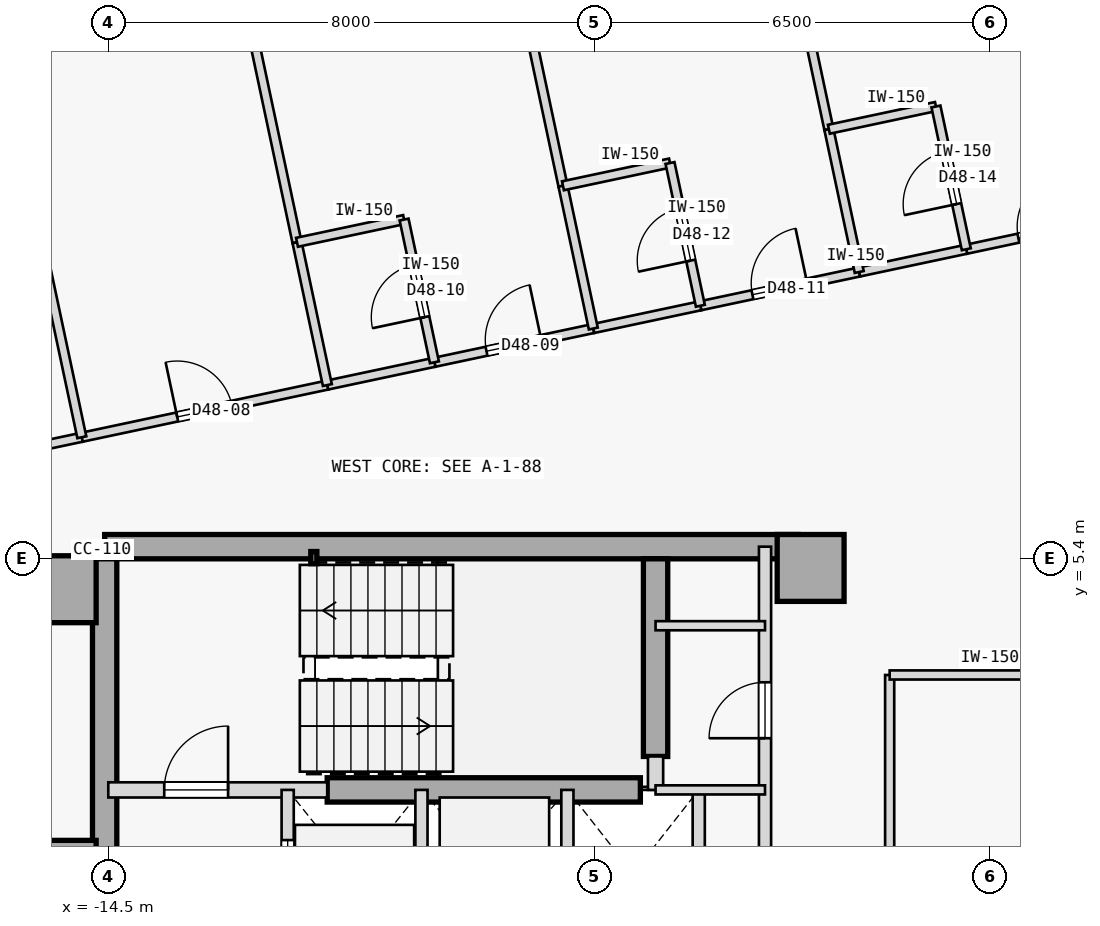
"""IFC4 building model, lengths in metres.
Left out: names, types, materials, properties, quantities, classifications, styles, units other than length and angle.
Written with IfcOpenShell. Run it as: python <this file> out.ifc"""

import sys

from ifc_helpers import new_model, si_unit, direction, frame, frame_2d, origin, origin_2d, place, context, subcontext, project, spatial, rectangle, hollow_rectangle, extrude, element, fill, save


model = new_model("IFC4")
c1 = context("Model", 3, precision=1e-05, world=origin(), true_north=direction((0.0, 1.0)))
c2 = subcontext(c1, "Body", "Model", "MODEL_VIEW")
j1 = project(units=[si_unit("LENGTHUNIT", "METRE"), si_unit("PLANEANGLEUNIT", "RADIAN")], contexts=[c1])
p1 = place(None, origin())
s1 = spatial("IfcSite", under=j1, at=p1, CompositionType="ELEMENT")
p2 = place(p1, origin())
s2 = spatial("IfcBuilding", under=s1, at=p2, CompositionType="ELEMENT")
p3 = place(p2, frame((0.0, 0.0, 185.4)))
s3 = spatial("IfcBuildingStorey", under=s2, at=p3, CompositionType="ELEMENT", Elevation=185.4)
for number, where, z_axis, x_axis in (
    (1, (-15.25, 4.9, 0.0), (0.0, 0.0, 1.0), (1.0, 0.0, 0.0)),
    (2, (-15.25, 0.22, 0.0), (0.0, 0.0, 1.0), (1.0, 0.0, 0.0)),
    (3, (-2.95, 5.25, 0.0), (0.0, 0.0, 1.0), (1.0, 0.0, 0.0)),
):
    element("IfcColumn", number, at=place(p3, frame(where, z_axis=z_axis, x_axis=x_axis)), inside=s3, PredefinedType="COLUMN", context=c2, shape_type="SweptSolid", body=[
        extrude(rectangle(XDim=1.1, YDim=1.1, at=origin_2d()), origin(), (0.0, 0.0, 1.0), 3.4),
    ])
p4 = place(p3, frame((-14.56, 5.6, 0.0), z_axis=(0.0, 0.0, 1.0), x_axis=(1.0, 0.0, 0.0)))
e4 = element("IfcWall", 4, at=p4, inside=s3, PredefinedType="SHEAR", context=c2, shape_type="SweptSolid", body=[
    extrude(rectangle(XDim=11.41, YDim=0.4, at=frame_2d((5.705, 0.0))), origin(), (0.0, 0.0, 1.0), 3.175),
])
p5 = place(p3, frame((-14.56, -5.4, 0.0), z_axis=(0.0, 0.0, 1.0), x_axis=(0.0, 1.0, 0.0)))
e5 = element("IfcWall", 5, at=p5, inside=s3, PredefinedType="SHEAR", context=c2, shape_type="SweptSolid", body=[
    extrude(rectangle(XDim=10.8, YDim=0.4, at=frame_2d((5.4, 0.0))), origin(), (0.0, 0.0, 1.0), 3.175),
])
p6 = place(p3, frame((-5.5, 2.15, 0.0), z_axis=(0.0, 0.0, 1.0), x_axis=(0.0, 1.0, 0.0)))
e6 = element("IfcWall", 6, at=p6, inside=s3, PredefinedType="SHEAR", context=c2, shape_type="SweptSolid", body=[
    extrude(rectangle(XDim=3.25, YDim=0.4, at=frame_2d((1.625, 0.0))), origin(), (0.0, 0.0, 1.0), 3.175),
])
p7 = place(p3, frame((-10.9, 1.6, 0.0), z_axis=(0.0, 0.0, 1.0), x_axis=(1.0, 0.0, 0.0)))
e7 = element("IfcWall", 7, at=p7, inside=s3, PredefinedType="SHEAR", context=c2, shape_type="SweptSolid", body=[
    extrude(rectangle(XDim=5.15, YDim=0.4, at=frame_2d((2.575, 0.0))), origin(), (0.0, 0.0, 1.0), 3.175),
])
p8 = place(p3, frame((-11.12, 5.42, 0.0), z_axis=(0.0, 0.0, 1.0), x_axis=(1.0, 0.0, 0.0)))
e8 = element("IfcColumn", 8, at=p8, inside=s3, PredefinedType="COLUMN", context=c2, shape_type="SweptSolid", body=[
    extrude(hollow_rectangle(XDim=0.1, YDim=0.2, WallThickness=0.008, at=origin_2d()), origin(), (0.0, 0.0, 1.0), 3.4),
])
p9 = place(p3, frame((-14.5, 1.6, 0.0), z_axis=(0.0, 0.0, 1.0), x_axis=(1.0, 0.0, 0.0)))
e9 = element("IfcWall", 9, at=p9, inside=s3, PredefinedType="STANDARD", context=c2, shape_type="SweptSolid", body=[
    extrude(rectangle(XDim=3.6, YDim=0.25, at=frame_2d((1.8, 0.0))), origin(), (0.0, 0.0, 1.0), 3.175),
])
p10 = place(p9, frame((0.92, 0.0, 0.0)))
e10 = element("IfcOpeningElement", 10, at=p10, cuts=e9, PredefinedType="OPENING", context=c2, shape_type="SweptSolid", body=[
    extrude(rectangle(XDim=1.05, YDim=2.15, at=frame_2d((0.525, 1.075))), frame((0.0, 0.135, 0.0), z_axis=(0.0, -1.0, 0.0), x_axis=(1.0, 0.0, 0.0)), (0.0, 0.0, 1.0), 0.27),
])
p11 = place(p3, frame((-5.5, 1.6, 0.0), z_axis=(0.0, 0.0, 1.0), x_axis=(0.0, 1.0, 0.0)))
e11 = element("IfcWall", 11, at=p11, inside=s3, PredefinedType="STANDARD", context=c2, shape_type="SweptSolid", body=[
    extrude(rectangle(XDim=0.55, YDim=0.25, at=frame_2d((0.275, 0.0))), origin(), (0.0, 0.0, 1.0), 3.175),
])
p12 = place(p3, frame((-3.7, -1.15, 0.0), z_axis=(0.0, 0.0, 1.0), x_axis=(0.0, 1.0, 0.0)))
e12 = element("IfcWall", 12, at=p12, inside=s3, PredefinedType="STANDARD", context=c2, shape_type="SweptSolid", body=[
    extrude(rectangle(XDim=6.75, YDim=0.2, at=frame_2d((3.375, 0.0))), origin(), (0.0, 0.0, 1.0), 3.175),
])
p13 = place(p12, frame((3.6, 0.0, 0.0)))
e13 = element("IfcOpeningElement", 13, at=p13, cuts=e12, PredefinedType="OPENING", context=c2, shape_type="SweptSolid", body=[
    extrude(rectangle(XDim=0.92, YDim=2.15, at=frame_2d((0.46, 1.075))), frame((0.0, 0.11, 0.0), z_axis=(0.0, -1.0, 0.0), x_axis=(1.0, 0.0, 0.0)), (0.0, 0.0, 1.0), 0.22),
])
p14 = place(p12, frame((0.85, 0.0, 0.0)))
e14 = element("IfcOpeningElement", 14, at=p14, cuts=e12, PredefinedType="OPENING", context=c2, shape_type="SweptSolid", body=[
    extrude(rectangle(XDim=0.9, YDim=2.15, at=frame_2d((0.45, 1.075))), frame((0.0, 0.11, 0.0), z_axis=(0.0, -1.0, 0.0), x_axis=(1.0, 0.0, 0.0)), (0.0, 0.0, 1.0), 0.22),
])
p15 = place(p3, frame((-11.55, -1.15, 0.0), z_axis=(0.0, 0.0, 1.0), x_axis=(0.0, 1.0, 0.0)))
e15 = element("IfcWall", 15, at=p15, inside=s3, PredefinedType="STANDARD", context=c2, shape_type="SweptSolid", body=[
    extrude(rectangle(XDim=2.75, YDim=0.2, at=frame_2d((1.375, 0.0))), origin(), (0.0, 0.0, 1.0), 3.175),
])
p16 = place(p15, frame((0.825, 0.0, 0.0)))
e16 = element("IfcOpeningElement", 16, at=p16, cuts=e15, PredefinedType="OPENING", context=c2, shape_type="SweptSolid", body=[
    extrude(rectangle(XDim=1.1, YDim=2.15, at=frame_2d((0.55, 1.075))), frame((0.0, 0.11, 0.0), z_axis=(0.0, -1.0, 0.0), x_axis=(1.0, 0.0, 0.0)), (0.0, 0.0, 1.0), 0.22),
])
for number, where, z_axis, x_axis in (
    (17, (-9.35, -1.15, 0.0), (0.0, 0.0, 1.0), (0.0, 1.0, 0.0)),
    (18, (-6.95, -1.15, 0.0), (0.0, 0.0, 1.0), (0.0, 1.0, 0.0)),
    (19, (-4.79, -1.15, 0.0), (0.0, 0.0, 1.0), (0.0, 1.0, 0.0)),
):
    element("IfcWall", number, at=place(p3, frame(where, z_axis=z_axis, x_axis=x_axis)), inside=s3, PredefinedType="STANDARD", context=c2, shape_type="SweptSolid", body=[
        extrude(rectangle(XDim=2.75, YDim=0.2, at=frame_2d((1.375, 0.0))), origin(), (0.0, 0.0, 1.0), 3.175),
    ])
for number, where, z_axis, x_axis in (
    (20, (-5.5, 4.3, 0.0), (0.0, 0.0, 1.0), (1.0, 0.0, 0.0)),
    (21, (-5.5, 1.6, 0.0), (0.0, 0.0, 1.0), (1.0, 0.0, 0.0)),
):
    element("IfcWall", number, at=place(p3, frame(where, z_axis=z_axis, x_axis=x_axis)), inside=s3, PredefinedType="PARTITIONING", context=c2, shape_type="SweptSolid", body=[
        extrude(rectangle(XDim=1.8, YDim=0.15, at=frame_2d((0.9, 0.0))), origin(), (0.0, 0.0, 1.0), 3.175),
    ])
p17 = place(p3, frame((-1.65, -3.49, 0.0), z_axis=(0.0, 0.0, 1.0), x_axis=(-3.4979712e-05, 0.999999999388, 0.0)))
e22 = element("IfcWall", 22, at=p17, inside=s3, PredefinedType="PARTITIONING", context=c2, shape_type="SweptSolid", body=[
    extrude(rectangle(XDim=6.979, YDim=0.15, at=frame_2d((3.49, 0.0))), origin(), (0.0, 0.0, 1.0), 3.175),
])
p18 = place(p3, frame((-1.65, 3.49, 0.0), z_axis=(0.0, 0.0, 1.0), x_axis=(1.0, 0.0, 0.0)))
e23 = element("IfcWall", 23, at=p18, inside=s3, PredefinedType="PARTITIONING", context=c2, shape_type="SweptSolid", body=[
    extrude(rectangle(XDim=3.3, YDim=0.15, at=frame_2d((1.65, 0.0))), origin(), (0.0, 0.0, 1.0), 3.175),
])
p19 = place(p3, frame((-17.162, 6.926, 0.0), z_axis=(0.0, 0.0, 1.0), x_axis=(0.978124500572, 0.208020338863, 0.0)))
e24 = element("IfcWall", 24, at=p19, inside=s3, PredefinedType="PARTITIONING", context=c2, shape_type="SweptSolid", body=[
    extrude(rectangle(XDim=2.277, YDim=0.15, at=frame_2d((1.138, 0.0))), origin(), (0.0, 0.0, 1.0), 3.175),
])
p20 = place(p3, frame((-14.935, 7.399, 0.0), z_axis=(0.0, 0.0, 1.0), x_axis=(0.978153289129, 0.20788492722, 0.0)))
e25 = element("IfcWall", 25, at=p20, inside=s3, PredefinedType="PARTITIONING", context=c2, shape_type="SweptSolid", body=[
    extrude(rectangle(XDim=4.128, YDim=0.15, at=frame_2d((2.064, 0.0))), origin(), (0.0, 0.0, 1.0), 3.175),
])
p21 = place(p20, frame((1.604, 0.0, 0.0)))
e26 = element("IfcOpeningElement", 26, at=p21, cuts=e25, PredefinedType="OPENING", context=c2, shape_type="SweptSolid", body=[
    extrude(rectangle(XDim=0.92, YDim=2.15, at=frame_2d((0.46, 1.075))), frame((0.0, 0.085, 0.0), z_axis=(0.0, -1.0, 0.0), x_axis=(1.0, 0.0, 0.0)), (0.0, 0.0, 1.0), 0.17),
])
p22 = place(p3, frame((-9.137, 8.632, 0.0), z_axis=(0.0, 0.0, 1.0), x_axis=(0.978158153975, 0.207862035524, 0.0)))
e27 = element("IfcWall", 27, at=p22, inside=s3, PredefinedType="PARTITIONING", context=c2, shape_type="SweptSolid", body=[
    extrude(rectangle(XDim=2.671, YDim=0.15, at=frame_2d((1.335, 0.0))), origin(), (0.0, 0.0, 1.0), 3.175),
])
p23 = place(p22, frame((0.875, 0.0, 0.0)))
e28 = element("IfcOpeningElement", 28, at=p23, cuts=e27, PredefinedType="OPENING", context=c2, shape_type="SweptSolid", body=[
    extrude(rectangle(XDim=0.92, YDim=2.15, at=frame_2d((0.46, 1.075))), frame((0.0, 0.085, 0.0), z_axis=(0.0, -1.0, 0.0), x_axis=(1.0, 0.0, 0.0)), (0.0, 0.0, 1.0), 0.17),
])
p24 = place(p3, frame((-10.897, 8.258, 0.0), z_axis=(0.0, 0.0, 1.0), x_axis=(0.978146440129, 0.207917150959, 0.0)))
e29 = element("IfcWall", 29, at=p24, inside=s3, PredefinedType="PARTITIONING", context=c2, shape_type="SweptSolid", body=[
    extrude(rectangle(XDim=1.8, YDim=0.15, at=frame_2d((0.9, 0.0))), origin(), (0.0, 0.0, 1.0), 3.175),
])
p25 = place(p3, frame((-4.763, 9.561, 0.0), z_axis=(0.0, 0.0, 1.0), x_axis=(0.978139565144, 0.207949491702, 0.0)))
e30 = element("IfcWall", 30, at=p25, inside=s3, PredefinedType="PARTITIONING", context=c2, shape_type="SweptSolid", body=[
    extrude(rectangle(XDim=2.671, YDim=0.15, at=frame_2d((1.335, 0.0))), origin(), (0.0, 0.0, 1.0), 3.175),
])
p26 = place(p25, frame((0.875, 0.0, 0.0)))
e31 = element("IfcOpeningElement", 31, at=p26, cuts=e30, PredefinedType="OPENING", context=c2, shape_type="SweptSolid", body=[
    extrude(rectangle(XDim=0.92, YDim=2.15, at=frame_2d((0.46, 1.075))), frame((0.0, 0.085, 0.0), z_axis=(0.0, -1.0, 0.0), x_axis=(1.0, 0.0, 0.0)), (0.0, 0.0, 1.0), 0.17),
])
p27 = place(p3, frame((-6.524, 9.187, 0.0), z_axis=(0.0, 0.0, 1.0), x_axis=(0.978146440129, 0.207917150959, 0.0)))
e32 = element("IfcWall", 32, at=p27, inside=s3, PredefinedType="PARTITIONING", context=c2, shape_type="SweptSolid", body=[
    extrude(rectangle(XDim=1.8, YDim=0.15, at=frame_2d((0.9, 0.0))), origin(), (0.0, 0.0, 1.0), 3.175),
])
p28 = place(p3, frame((-0.39, 10.491, 0.0), z_axis=(0.0, 0.0, 1.0), x_axis=(0.978155367406, 0.207875148141, 0.0)))
e33 = element("IfcWall", 33, at=p28, inside=s3, PredefinedType="PARTITIONING", context=c2, shape_type="SweptSolid", body=[
    extrude(rectangle(XDim=2.672, YDim=0.15, at=frame_2d((1.336, 0.0))), origin(), (0.0, 0.0, 1.0), 3.175),
])
p29 = place(p28, frame((0.876, 0.0, 0.0)))
e34 = element("IfcOpeningElement", 34, at=p29, cuts=e33, PredefinedType="OPENING", context=c2, shape_type="SweptSolid", body=[
    extrude(rectangle(XDim=0.92, YDim=2.15, at=frame_2d((0.46, 1.075))), frame((0.0, 0.085, 0.0), z_axis=(0.0, -1.0, 0.0), x_axis=(1.0, 0.0, 0.0)), (0.0, 0.0, 1.0), 0.17),
])
p30 = place(p3, frame((-2.151, 10.117, 0.0), z_axis=(0.0, 0.0, 1.0), x_axis=(0.978146440129, 0.207917150959, 0.0)))
e35 = element("IfcWall", 35, at=p30, inside=s3, PredefinedType="PARTITIONING", context=c2, shape_type="SweptSolid", body=[
    extrude(rectangle(XDim=1.8, YDim=0.15, at=frame_2d((0.9, 0.0))), origin(), (0.0, 0.0, 1.0), 3.175),
])
p31 = place(p3, frame((-14.935, 7.399, 0.0), z_axis=(0.0, 0.0, 1.0), x_axis=(-0.207899121568, 0.978150272326, 0.0)))
e36 = element("IfcWall", 36, at=p31, inside=s3, PredefinedType="PARTITIONING", context=c2, shape_type="SweptSolid", body=[
    extrude(rectangle(XDim=14.395, YDim=0.15, at=frame_2d((7.197, 0.0))), origin(), (0.0, 0.0, 1.0), 3.175),
])
p32 = place(p3, frame((-11.396, 10.605, 0.0), z_axis=(0.0, 0.0, 1.0), x_axis=(-0.207910848762, 0.978147779718, 0.0)))
e37 = element("IfcWall", 37, at=p32, inside=s3, PredefinedType="PARTITIONING", context=c2, shape_type="SweptSolid", body=[
    extrude(rectangle(XDim=11.995, YDim=0.15, at=frame_2d((5.998, 0.0))), origin(), (0.0, 0.0, 1.0), 3.175),
])
p33 = place(p3, frame((-10.897, 8.258, 0.0), z_axis=(0.0, 0.0, 1.0), x_axis=(-0.207937840262, 0.978142042133, 0.0)))
e38 = element("IfcWall", 38, at=p33, inside=s3, PredefinedType="PARTITIONING", context=c2, shape_type="SweptSolid", body=[
    extrude(rectangle(XDim=2.4, YDim=0.15, at=frame_2d((1.2, 0.0))), origin(), (0.0, 0.0, 1.0), 3.175),
])
p34 = place(p3, frame((-11.396, 10.605, 0.0), z_axis=(0.0, 0.0, 1.0), x_axis=(0.978118849246, 0.208046909975, 0.0)))
e39 = element("IfcWall", 39, at=p34, inside=s3, PredefinedType="PARTITIONING", context=c2, shape_type="SweptSolid", body=[
    extrude(rectangle(XDim=1.8, YDim=0.15, at=frame_2d((0.9, 0.0))), origin(), (0.0, 0.0, 1.0), 3.175),
])
p35 = place(p3, frame((-9.137, 8.632, 0.0), z_axis=(0.0, 0.0, 1.0), x_axis=(-0.207917150959, 0.978146440129, 0.0)))
e40 = element("IfcWall", 40, at=p35, inside=s3, PredefinedType="PARTITIONING", context=c2, shape_type="SweptSolid", body=[
    extrude(rectangle(XDim=2.4, YDim=0.15, at=frame_2d((1.2, 0.0))), origin(), (0.0, 0.0, 1.0), 3.175),
])
p36 = place(p35, frame((0.76, 0.0, 0.0)))
e41 = element("IfcOpeningElement", 41, at=p36, cuts=e40, PredefinedType="OPENING", context=c2, shape_type="SweptSolid", body=[
    extrude(rectangle(XDim=0.88, YDim=2.15, at=frame_2d((0.44, 1.075))), frame((0.0, 0.085, 0.0), z_axis=(0.0, -1.0, 0.0), x_axis=(1.0, 0.0, 0.0)), (0.0, 0.0, 1.0), 0.17),
])
p37 = place(p3, frame((-7.023, 11.535, 0.0), z_axis=(0.0, 0.0, 1.0), x_axis=(-0.207910848762, 0.978147779718, 0.0)))
e42 = element("IfcWall", 42, at=p37, inside=s3, PredefinedType="PARTITIONING", context=c2, shape_type="SweptSolid", body=[
    extrude(rectangle(XDim=11.995, YDim=0.15, at=frame_2d((5.998, 0.0))), origin(), (0.0, 0.0, 1.0), 3.175),
])
p38 = place(p3, frame((-6.524, 9.187, 0.0), z_axis=(0.0, 0.0, 1.0), x_axis=(-0.207917150959, 0.978146440129, 0.0)))
e43 = element("IfcWall", 43, at=p38, inside=s3, PredefinedType="PARTITIONING", context=c2, shape_type="SweptSolid", body=[
    extrude(rectangle(XDim=2.4, YDim=0.15, at=frame_2d((1.2, 0.0))), origin(), (0.0, 0.0, 1.0), 3.175),
])
p39 = place(p3, frame((-7.023, 11.535, 0.0), z_axis=(0.0, 0.0, 1.0), x_axis=(0.978146440129, 0.207917150959, 0.0)))
e44 = element("IfcWall", 44, at=p39, inside=s3, PredefinedType="PARTITIONING", context=c2, shape_type="SweptSolid", body=[
    extrude(rectangle(XDim=1.8, YDim=0.15, at=frame_2d((0.9, 0.0))), origin(), (0.0, 0.0, 1.0), 3.175),
])
p40 = place(p3, frame((-4.763, 9.561, 0.0), z_axis=(0.0, 0.0, 1.0), x_axis=(-0.207917150959, 0.978146440129, 0.0)))
e45 = element("IfcWall", 45, at=p40, inside=s3, PredefinedType="PARTITIONING", context=c2, shape_type="SweptSolid", body=[
    extrude(rectangle(XDim=2.4, YDim=0.15, at=frame_2d((1.2, 0.0))), origin(), (0.0, 0.0, 1.0), 3.175),
])
p41 = place(p40, frame((0.76, 0.0, 0.0)))
e46 = element("IfcOpeningElement", 46, at=p41, cuts=e45, PredefinedType="OPENING", context=c2, shape_type="SweptSolid", body=[
    extrude(rectangle(XDim=0.88, YDim=2.15, at=frame_2d((0.44, 1.075))), frame((0.0, 0.085, 0.0), z_axis=(0.0, -1.0, 0.0), x_axis=(1.0, 0.0, 0.0)), (0.0, 0.0, 1.0), 0.17),
])
p42 = place(p3, frame((-2.65, 12.464, 0.0), z_axis=(0.0, 0.0, 1.0), x_axis=(-0.207914988081, 0.978146899873, 0.0)))
e47 = element("IfcWall", 47, at=p42, inside=s3, PredefinedType="PARTITIONING", context=c2, shape_type="SweptSolid", body=[
    extrude(rectangle(XDim=11.995, YDim=0.15, at=frame_2d((5.998, 0.0))), origin(), (0.0, 0.0, 1.0), 3.175),
])
p43 = place(p3, frame((-2.151, 10.117, 0.0), z_axis=(0.0, 0.0, 1.0), x_axis=(-0.207917150959, 0.978146440129, 0.0)))
e48 = element("IfcWall", 48, at=p43, inside=s3, PredefinedType="PARTITIONING", context=c2, shape_type="SweptSolid", body=[
    extrude(rectangle(XDim=2.4, YDim=0.15, at=frame_2d((1.2, 0.0))), origin(), (0.0, 0.0, 1.0), 3.175),
])
p44 = place(p3, frame((-2.65, 12.464, 0.0), z_axis=(0.0, 0.0, 1.0), x_axis=(0.978174015353, 0.207787380965, 0.0)))
e49 = element("IfcWall", 49, at=p44, inside=s3, PredefinedType="PARTITIONING", context=c2, shape_type="SweptSolid", body=[
    extrude(rectangle(XDim=1.8, YDim=0.15, at=frame_2d((0.9, 0.0))), origin(), (0.0, 0.0, 1.0), 3.175),
])
p45 = place(p3, frame((-0.39, 10.491, 0.0), z_axis=(0.0, 0.0, 1.0), x_axis=(-0.207937840262, 0.978142042133, 0.0)))
e50 = element("IfcWall", 50, at=p45, inside=s3, PredefinedType="PARTITIONING", context=c2, shape_type="SweptSolid", body=[
    extrude(rectangle(XDim=2.4, YDim=0.15, at=frame_2d((1.2, 0.0))), origin(), (0.0, 0.0, 1.0), 3.175),
])
p46 = place(p45, frame((0.76, 0.0, 0.0)))
e51 = element("IfcOpeningElement", 51, at=p46, cuts=e50, PredefinedType="OPENING", context=c2, shape_type="SweptSolid", body=[
    extrude(rectangle(XDim=0.88, YDim=2.15, at=frame_2d((0.44, 1.075))), frame((0.0, 0.085, 0.0), z_axis=(0.0, -1.0, 0.0), x_axis=(1.0, 0.0, 0.0)), (0.0, 0.0, 1.0), 0.17),
])
p47 = place(p3, frame((1.725, 13.394, 0.0), z_axis=(0.0, 0.0, 1.0), x_axis=(-0.207910848762, 0.978147779718, 0.0)))
e52 = element("IfcWall", 52, at=p47, inside=s3, PredefinedType="PARTITIONING", context=c2, shape_type="SweptSolid", body=[
    extrude(rectangle(XDim=11.995, YDim=0.15, at=frame_2d((5.998, 0.0))), origin(), (0.0, 0.0, 1.0), 3.175),
])
p48 = place(p10, origin())
e53 = element("IfcDoor", 53, at=p48, inside=s3, OperationType="SINGLE_SWING_RIGHT", PredefinedType="DOOR", context=c2, shape_type="SweptSolid", body=[
    extrude(rectangle(XDim=1.05, YDim=2.15, at=frame_2d((0.525, 1.075))), frame((0.0, 0.025, 0.0), z_axis=(0.0, -1.0, 0.0), x_axis=(1.0, 0.0, 0.0)), (0.0, 0.0, 1.0), 0.05),
])
fill(e10, e53)
p49 = place(p16, origin())
e54 = element("IfcDoor", 54, at=p49, inside=s3, OperationType="SLIDING_TO_RIGHT", PredefinedType="DOOR", context=c2, shape_type="SweptSolid", body=[
    extrude(rectangle(XDim=1.1, YDim=2.15, at=frame_2d((0.55, 1.075))), frame((0.0, 0.025, 0.0), z_axis=(0.0, -1.0, 0.0), x_axis=(1.0, 0.0, 0.0)), (0.0, 0.0, 1.0), 0.05),
])
fill(e16, e54)
p50 = place(p13, origin())
e55 = element("IfcDoor", 55, at=p50, inside=s3, OperationType="SINGLE_SWING_LEFT", PredefinedType="DOOR", context=c2, shape_type="SweptSolid", body=[
    extrude(rectangle(XDim=0.92, YDim=2.15, at=frame_2d((0.46, 1.075))), frame((0.0, 0.025, 0.0), z_axis=(0.0, -1.0, 0.0), x_axis=(1.0, 0.0, 0.0)), (0.0, 0.0, 1.0), 0.05),
])
fill(e13, e55)
p51 = place(p21, origin())
e56 = element("IfcDoor", 56, at=p51, inside=s3, OperationType="SINGLE_SWING_LEFT", PredefinedType="DOOR", context=c2, shape_type="SweptSolid", body=[
    extrude(rectangle(XDim=0.92, YDim=2.15, at=frame_2d((0.46, 1.075))), frame((0.0, 0.025, 0.0), z_axis=(0.0, -1.0, 0.0), x_axis=(1.0, 0.0, 0.0)), (0.0, 0.0, 1.0), 0.05),
])
fill(e26, e56)
p52 = place(p23, origin())
e57 = element("IfcDoor", 57, at=p52, inside=s3, OperationType="SINGLE_SWING_RIGHT", PredefinedType="DOOR", context=c2, shape_type="SweptSolid", body=[
    extrude(rectangle(XDim=0.92, YDim=2.15, at=frame_2d((0.46, 1.075))), frame((0.0, 0.025, 0.0), z_axis=(0.0, -1.0, 0.0), x_axis=(1.0, 0.0, 0.0)), (0.0, 0.0, 1.0), 0.05),
])
fill(e28, e57)
p53 = place(p36, origin())
e58 = element("IfcDoor", 58, at=p53, inside=s3, OperationType="SINGLE_SWING_LEFT", PredefinedType="DOOR", context=c2, shape_type="SweptSolid", body=[
    extrude(rectangle(XDim=0.88, YDim=2.15, at=frame_2d((0.44, 1.075))), frame((0.0, 0.025, 0.0), z_axis=(0.0, -1.0, 0.0), x_axis=(1.0, 0.0, 0.0)), (0.0, 0.0, 1.0), 0.05),
])
fill(e41, e58)
p54 = place(p26, origin())
e59 = element("IfcDoor", 59, at=p54, inside=s3, OperationType="SINGLE_SWING_RIGHT", PredefinedType="DOOR", context=c2, shape_type="SweptSolid", body=[
    extrude(rectangle(XDim=0.92, YDim=2.15, at=frame_2d((0.46, 1.075))), frame((0.0, 0.025, 0.0), z_axis=(0.0, -1.0, 0.0), x_axis=(1.0, 0.0, 0.0)), (0.0, 0.0, 1.0), 0.05),
])
fill(e31, e59)
p55 = place(p41, origin())
e60 = element("IfcDoor", 60, at=p55, inside=s3, OperationType="SINGLE_SWING_LEFT", PredefinedType="DOOR", context=c2, shape_type="SweptSolid", body=[
    extrude(rectangle(XDim=0.88, YDim=2.15, at=frame_2d((0.44, 1.075))), frame((0.0, 0.025, 0.0), z_axis=(0.0, -1.0, 0.0), x_axis=(1.0, 0.0, 0.0)), (0.0, 0.0, 1.0), 0.05),
])
fill(e46, e60)
p56 = place(p29, origin())
e61 = element("IfcDoor", 61, at=p56, inside=s3, OperationType="SINGLE_SWING_RIGHT", PredefinedType="DOOR", context=c2, shape_type="SweptSolid", body=[
    extrude(rectangle(XDim=0.92, YDim=2.15, at=frame_2d((0.46, 1.075))), frame((0.0, 0.025, 0.0), z_axis=(0.0, -1.0, 0.0), x_axis=(1.0, 0.0, 0.0)), (0.0, 0.0, 1.0), 0.05),
])
fill(e34, e61)
p57 = place(p46, origin())
e62 = element("IfcDoor", 62, at=p57, inside=s3, OperationType="SINGLE_SWING_LEFT", PredefinedType="DOOR", context=c2, shape_type="SweptSolid", body=[
    extrude(rectangle(XDim=0.88, YDim=2.15, at=frame_2d((0.44, 1.075))), frame((0.0, 0.025, 0.0), z_axis=(0.0, -1.0, 0.0), x_axis=(1.0, 0.0, 0.0)), (0.0, 0.0, 1.0), 0.05),
])
fill(e51, e62)
save(model, sys.argv[1])
